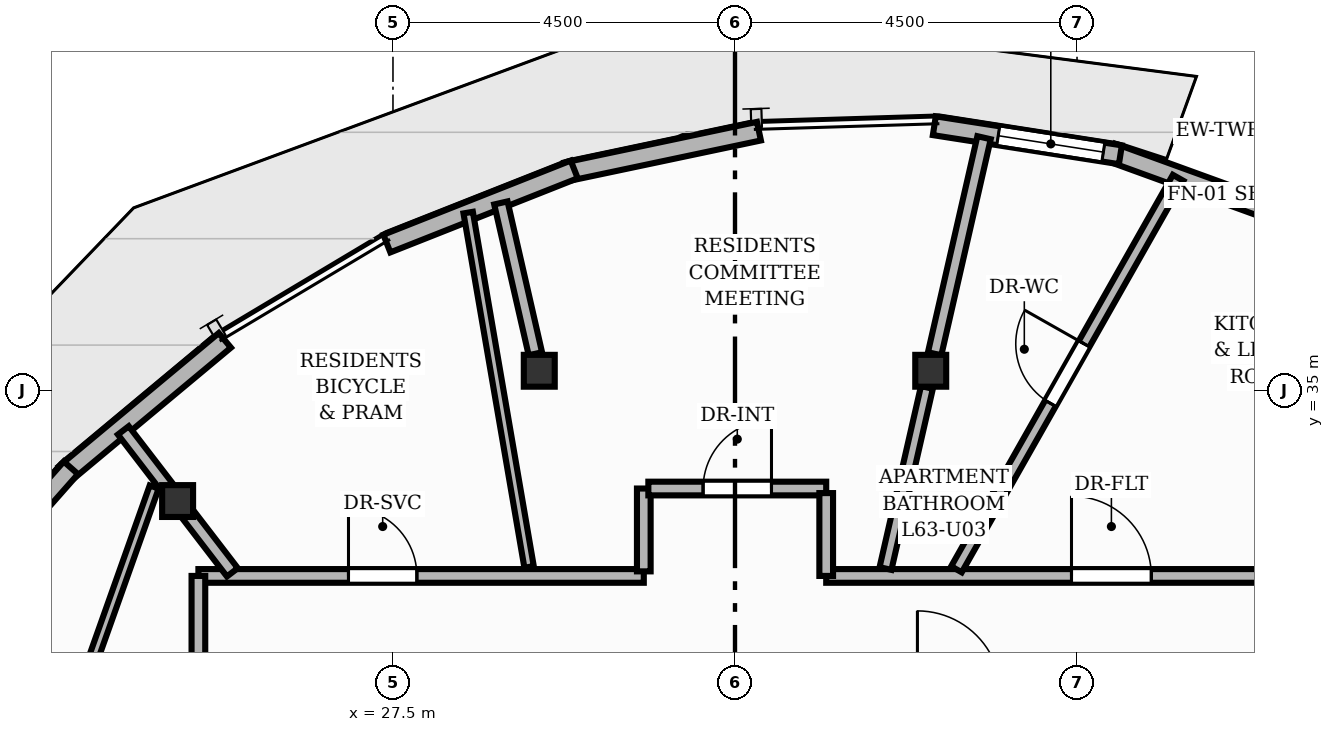
"""IFC4 building model, lengths in metres.
Left out: names, types, materials, properties, quantities, classifications, styles, units other than length and angle.
Written with IfcOpenShell. Run it as: python <this file> out.ifc"""

import sys

from ifc_helpers import new_model, si_unit, direction, frame, frame_2d, origin, origin_2d, place, context, subcontext, project, spatial, rectangle, i_section, extrude, element, fill, save


model = new_model("IFC4")
c1 = context("Model", 3, precision=1e-05, world=origin(), true_north=direction((0.0, 1.0)))
c2 = subcontext(c1, "Body", "Model", "MODEL_VIEW")
j1 = project(units=[si_unit("LENGTHUNIT", "METRE"), si_unit("PLANEANGLEUNIT", "RADIAN")], contexts=[c1])
p1 = place(None, origin())
s1 = spatial("IfcSite", under=j1, at=p1, CompositionType="ELEMENT")
p2 = place(p1, origin())
s2 = spatial("IfcBuilding", under=s1, at=p2, CompositionType="ELEMENT")
p3 = place(p2, frame((0.0, 0.0, 211.04)))
s3 = spatial("IfcBuildingStorey", under=s2, at=p3, CompositionType="ELEMENT", Elevation=211.04)
for number, where, z_axis, x_axis in (
    (1, (34.575, 35.26, 0.0), (0.0, 0.0, 1.0), (1.0, 0.0, 0.0)),
    (2, (29.425, 35.26, 0.0), (0.0, 0.0, 1.0), (1.0, 0.0, 0.0)),
    (3, (24.667, 33.545, 0.0), (0.0, 0.0, 1.0), (1.0, 0.0, 0.0)),
):
    element("IfcColumn", number, at=place(p3, frame(where, z_axis=z_axis, x_axis=x_axis)), inside=s3, PredefinedType="COLUMN", context=c2, shape_type="SweptSolid", body=[
        extrude(i_section(OverallWidth=0.407, OverallDepth=0.419, WebThickness=0.031, FlangeThickness=0.049, at=origin_2d()), origin(), (0.0, 0.0, 1.0), 3.2),
    ])
p4 = place(p3, frame((36.96, 38.13, 0.0), z_axis=(0.0, 0.0, 1.0), x_axis=(0.939954186413, -0.341300640851, 0.0)))
e4 = element("IfcWall", 4, at=p4, inside=s3, PredefinedType="SOLIDWALL", context=c2, shape_type="SweptSolid", body=[
    extrude(rectangle(XDim=2.437, YDim=0.25, at=frame_2d((1.219, 0.0))), origin(), (0.0, 0.0, 1.0), 2.96),
])
p5 = place(p3, frame((34.622, 38.484, 0.0), z_axis=(0.0, 0.0, 1.0), x_axis=(0.988040195026, -0.154196540209, 0.0)))
e5 = element("IfcWall", 5, at=p5, inside=s3, PredefinedType="SOLIDWALL", context=c2, shape_type="SweptSolid", body=[
    extrude(rectangle(XDim=2.478, YDim=0.25, at=frame_2d((1.239, 0.0))), origin(), (0.0, 0.0, 1.0), 2.96),
])
p6 = place(p5, frame((0.851, 0.0, 0.85)))
e6 = element("IfcOpeningElement", 6, at=p6, cuts=e5, PredefinedType="OPENING", context=c2, shape_type="SweptSolid", body=[
    extrude(rectangle(XDim=1.4, YDim=1.52, at=frame_2d((0.7, 0.76))), frame((0.0, 0.135, 0.0), z_axis=(0.0, -1.0, 0.0), x_axis=(1.0, 0.0, 0.0)), (0.0, 0.0, 1.0), 0.27),
])
p7 = place(p3, frame((29.779, 37.877, 0.0), z_axis=(0.0, 0.0, 1.0), x_axis=(0.978434707222, 0.206556345104, 0.0)))
e7 = element("IfcWall", 7, at=p7, inside=s3, PredefinedType="SOLIDWALL", context=c2, shape_type="SweptSolid", body=[
    extrude(rectangle(XDim=2.592, YDim=0.25, at=frame_2d((1.296, 0.0))), origin(), (0.0, 0.0, 1.0), 2.96),
])
p8 = place(p3, frame((27.42, 36.933, 0.0), z_axis=(0.0, 0.0, 1.0), x_axis=(0.929861098324, 0.36791077427, 0.0)))
e8 = element("IfcWall", 8, at=p8, inside=s3, PredefinedType="SOLIDWALL", context=c2, shape_type="SweptSolid", body=[
    extrude(rectangle(XDim=2.651, YDim=0.25, at=frame_2d((1.326, 0.0))), origin(), (0.0, 0.0, 1.0), 2.96),
])
p9 = place(p3, frame((23.184, 33.906, 0.0), z_axis=(0.0, 0.0, 1.0), x_axis=(0.76821397209, 0.640193168571, 0.0)))
e9 = element("IfcWall", 9, at=p9, inside=s3, PredefinedType="SOLIDWALL", context=c2, shape_type="SweptSolid", body=[
    extrude(rectangle(XDim=2.739, YDim=0.25, at=frame_2d((1.369, 0.0))), origin(), (0.0, 0.0, 1.0), 2.96),
])
p10 = place(p3, frame((21.437, 31.915, 0.0), z_axis=(0.0, 0.0, 1.0), x_axis=(0.661694827408, 0.749773269317, 0.0)))
e10 = element("IfcWall", 10, at=p10, inside=s3, PredefinedType="SOLIDWALL", context=c2, shape_type="SweptSolid", body=[
    extrude(rectangle(XDim=2.758, YDim=0.25, at=frame_2d((1.379, 0.0))), origin(), (0.0, 0.0, 1.0), 2.96),
])
p11 = place(p10, frame((0.554, 0.0, 0.85)))
e11 = element("IfcOpeningElement", 11, at=p11, cuts=e10, PredefinedType="OPENING", context=c2, shape_type="SweptSolid", body=[
    extrude(rectangle(XDim=1.65, YDim=1.55, at=frame_2d((0.825, 0.775))), frame((0.0, 0.135, 0.0), z_axis=(0.0, -1.0, 0.0), x_axis=(1.0, 0.0, 0.0)), (0.0, 0.0, 1.0), 0.27),
])
p12 = place(p3, frame((34.626, 35.483, 0.0), z_axis=(0.0, 0.0, 1.0), x_axis=(0.222945280676, 0.974830960641, 0.0)))
e12 = element("IfcWall", 12, at=p12, inside=s3, PredefinedType="PARTITIONING", context=c2, shape_type="SweptSolid", body=[
    extrude(rectangle(XDim=2.916, YDim=0.18, at=frame_2d((1.458, 0.0))), origin(), (0.0, 0.0, 1.0), 2.403),
])
p13 = place(p3, frame((29.374, 35.483, 0.0), z_axis=(0.0, 0.0, 1.0), x_axis=(-0.222932254148, 0.974833939736, 0.0)))
e13 = element("IfcWall", 13, at=p13, inside=s3, PredefinedType="PARTITIONING", context=c2, shape_type="SweptSolid", body=[
    extrude(rectangle(XDim=2.036, YDim=0.18, at=frame_2d((1.018, 0.0))), origin(), (0.0, 0.0, 1.0), 2.403),
])
p14 = place(p3, frame((24.527, 33.727, 0.0), z_axis=(0.0, 0.0, 1.0), x_axis=(-0.60903478373, 0.793143512995, 0.0)))
e14 = element("IfcWall", 14, at=p14, inside=s3, PredefinedType="PARTITIONING", context=c2, shape_type="SweptSolid", body=[
    extrude(rectangle(XDim=0.943, YDim=0.18, at=frame_2d((0.471, 0.0))), origin(), (0.0, 0.0, 1.0), 2.403),
])
p15 = place(p3, frame((33.2, 32.56, 0.0), z_axis=(0.0, 0.0, 1.0), x_axis=(1.0, 0.0, 0.0)))
e15 = element("IfcWall", 15, at=p15, inside=s3, PredefinedType="PARTITIONING", context=c2, shape_type="SweptSolid", body=[
    extrude(rectangle(XDim=5.86, YDim=0.18, at=frame_2d((2.93, 0.0))), origin(), (0.0, 0.0, 1.0), 2.955),
])
p16 = place(p15, frame((3.227, 0.0, 0.0)))
e16 = element("IfcOpeningElement", 16, at=p16, cuts=e15, PredefinedType="OPENING", context=c2, shape_type="SweptSolid", body=[
    extrude(rectangle(XDim=1.05, YDim=2.15, at=frame_2d((0.525, 1.075))), frame((0.0, 0.1, 0.0), z_axis=(0.0, -1.0, 0.0), x_axis=(1.0, 0.0, 0.0)), (0.0, 0.0, 1.0), 0.2),
])
p17 = place(p3, frame((24.94, 32.56, 0.0), z_axis=(0.0, 0.0, 1.0), x_axis=(1.0, 0.0, 0.0)))
e17 = element("IfcWall", 17, at=p17, inside=s3, PredefinedType="PARTITIONING", context=c2, shape_type="SweptSolid", body=[
    extrude(rectangle(XDim=5.86, YDim=0.18, at=frame_2d((2.93, 0.0))), origin(), (0.0, 0.0, 1.0), 2.955),
])
p18 = place(p17, frame((1.975, 0.0, 0.0)))
e18 = element("IfcOpeningElement", 18, at=p18, cuts=e17, PredefinedType="OPENING", context=c2, shape_type="SweptSolid", body=[
    extrude(rectangle(XDim=0.9, YDim=2.1, at=frame_2d((0.45, 1.05))), frame((0.0, 0.1, 0.0), z_axis=(0.0, -1.0, 0.0), x_axis=(1.0, 0.0, 0.0)), (0.0, 0.0, 1.0), 0.2),
])
p19 = place(p3, frame((30.8, 32.62, 0.0), z_axis=(0.0, 0.0, 1.0), x_axis=(0.0, 1.0, 0.0)))
e19 = element("IfcWall", 19, at=p19, inside=s3, PredefinedType="PARTITIONING", context=c2, shape_type="SweptSolid", body=[
    extrude(rectangle(XDim=1.09, YDim=0.18, at=frame_2d((0.545, 0.0))), origin(), (0.0, 0.0, 1.0), 2.955),
])
p20 = place(p3, frame((30.86, 33.71, 0.0), z_axis=(0.0, 0.0, 1.0), x_axis=(1.0, 0.0, 0.0)))
e20 = element("IfcWall", 20, at=p20, inside=s3, PredefinedType="PARTITIONING", context=c2, shape_type="SweptSolid", body=[
    extrude(rectangle(XDim=2.34, YDim=0.18, at=frame_2d((1.17, 0.0))), origin(), (0.0, 0.0, 1.0), 2.955),
])
p21 = place(p20, frame((0.72, 0.0, 0.0)))
e21 = element("IfcOpeningElement", 21, at=p21, cuts=e20, PredefinedType="OPENING", context=c2, shape_type="SweptSolid", body=[
    extrude(rectangle(XDim=0.9, YDim=2.1, at=frame_2d((0.45, 1.05))), frame((0.0, 0.1, 0.0), z_axis=(0.0, -1.0, 0.0), x_axis=(1.0, 0.0, 0.0)), (0.0, 0.0, 1.0), 0.2),
])
p22 = place(p3, frame((33.2, 33.65, 0.0), z_axis=(0.0, 0.0, 1.0), x_axis=(0.0, -1.0, 0.0)))
e22 = element("IfcWall", 22, at=p22, inside=s3, PredefinedType="PARTITIONING", context=c2, shape_type="SweptSolid", body=[
    extrude(rectangle(XDim=1.09, YDim=0.18, at=frame_2d((0.545, 0.0))), origin(), (0.0, 0.0, 1.0), 2.955),
])
p23 = place(p3, frame((24.94, 15.44, 0.0), z_axis=(0.0, 0.0, 1.0), x_axis=(0.0, 1.0, 0.0)))
e23 = element("IfcWall", 23, at=p23, inside=s3, PredefinedType="PARTITIONING", context=c2, shape_type="SweptSolid", body=[
    extrude(rectangle(XDim=17.12, YDim=0.18, at=frame_2d((8.56, 0.0))), origin(), (0.0, 0.0, 1.0), 2.955),
])
p24 = place(p23, frame((4.404, 0.0, 0.0)))
e24 = element("IfcOpeningElement", 24, at=p24, cuts=e23, PredefinedType="OPENING", context=c2, shape_type="SweptSolid", body=[
    extrude(rectangle(XDim=1.05, YDim=2.15, at=frame_2d((0.525, 1.075))), frame((0.0, 0.1, 0.0), z_axis=(0.0, -1.0, 0.0), x_axis=(1.0, 0.0, 0.0)), (0.0, 0.0, 1.0), 0.2),
])
p25 = place(p3, frame((34.914, 32.647, 0.0), z_axis=(0.0, 0.0, 1.0), x_axis=(0.492777372346, 0.870155423648, 0.0)))
e25 = element("IfcWall", 25, at=p25, inside=s3, PredefinedType="PLUMBINGWALL", context=c2, shape_type="SweptSolid", body=[
    extrude(rectangle(XDim=5.919, YDim=0.16, at=frame_2d((2.96, 0.0))), origin(), (0.0, 0.0, 1.0), 2.692),
])
p26 = place(p25, frame((2.51, 0.0, 0.0)))
e26 = element("IfcOpeningElement", 26, at=p26, cuts=e25, PredefinedType="OPENING", context=c2, shape_type="SweptSolid", body=[
    extrude(rectangle(XDim=0.9, YDim=2.1, at=frame_2d((0.45, 1.05))), frame((0.0, 0.09, 0.0), z_axis=(0.0, -1.0, 0.0), x_axis=(1.0, 0.0, 0.0)), (0.0, 0.0, 1.0), 0.18),
])
p27 = place(p3, frame((33.98, 32.657, 0.0), z_axis=(0.0, 0.0, 1.0), x_axis=(0.223006482474, 0.974816961678, 0.0)))
e27 = element("IfcWall", 27, at=p27, inside=s3, PredefinedType="PLUMBINGWALL", context=c2, shape_type="SweptSolid", body=[
    extrude(rectangle(XDim=2.445, YDim=0.16, at=frame_2d((1.222, 0.0))), origin(), (0.0, 0.0, 1.0), 2.403),
])
p28 = place(p3, frame((28.49, 37.341, 0.0), z_axis=(0.0, 0.0, 1.0), x_axis=(0.169376334169, -0.98555144839, 0.0)))
e28 = element("IfcWall", 28, at=p28, inside=s3, PredefinedType="PARTITIONING", context=c2, shape_type="SweptSolid", body=[
    extrude(rectangle(XDim=4.731, YDim=0.125, at=frame_2d((2.365, 0.0))), origin(), (0.0, 0.0, 1.0), 2.955),
])
p29 = place(p3, frame((25.387, 32.608, 0.0), z_axis=(0.0, 0.0, 1.0), x_axis=(-0.609302225724, 0.792938079378, 0.0)))
e29 = element("IfcWall", 29, at=p29, inside=s3, PredefinedType="PARTITIONING", context=c2, shape_type="SweptSolid", body=[
    extrude(rectangle(XDim=0.953, YDim=0.18, at=frame_2d((0.477, 0.0))), origin(), (0.0, 0.0, 1.0), 2.403),
])
p30 = place(p3, frame((20.501, 22.87, 0.0), z_axis=(0.0, 0.0, 1.0), x_axis=(0.334686593727, 0.942329498625, 0.0)))
e30 = element("IfcWall", 30, at=p30, inside=s3, PredefinedType="PARTITIONING", context=c2, shape_type="SweptSolid", body=[
    extrude(rectangle(XDim=11.525, YDim=0.125, at=frame_2d((5.762, 0.0))), origin(), (0.0, 0.0, 1.0), 2.488),
])
p31 = place(p30, frame((5.312, 0.0, 0.0)))
e31 = element("IfcOpeningElement", 31, at=p31, cuts=e30, PredefinedType="OPENING", context=c2, shape_type="SweptSolid", body=[
    extrude(rectangle(XDim=0.9, YDim=2.1, at=frame_2d((0.45, 1.05))), frame((0.0, 0.073, 0.0), z_axis=(0.0, -1.0, 0.0), x_axis=(1.0, 0.0, 0.0)), (0.0, 0.0, 1.0), 0.145),
])
p32 = place(p6, origin())
e32 = element("IfcWindow", 32, at=p32, inside=s3, PartitioningType="SINGLE_PANEL", PredefinedType="WINDOW", context=c2, shape_type="SweptSolid", body=[
    extrude(rectangle(XDim=1.4, YDim=1.52, at=frame_2d((0.7, 0.76))), frame((0.0, 0.03, 0.0), z_axis=(0.0, -1.0, 0.0), x_axis=(1.0, 0.0, 0.0)), (0.0, 0.0, 1.0), 0.06),
])
fill(e6, e32)
p33 = place(p16, origin())
e33 = element("IfcDoor", 33, at=p33, inside=s3, OperationType="SINGLE_SWING_LEFT", PredefinedType="DOOR", context=c2, shape_type="SweptSolid", body=[
    extrude(rectangle(XDim=1.05, YDim=2.15, at=frame_2d((0.525, 1.075))), frame((0.0, 0.025, 0.0), z_axis=(0.0, -1.0, 0.0), x_axis=(1.0, 0.0, 0.0)), (0.0, 0.0, 1.0), 0.05),
])
fill(e16, e33)
p34 = place(p26, origin())
e34 = element("IfcDoor", 34, at=p34, inside=s3, OperationType="SINGLE_SWING_RIGHT", PredefinedType="DOOR", context=c2, shape_type="SweptSolid", body=[
    extrude(rectangle(XDim=0.9, YDim=2.1, at=frame_2d((0.45, 1.05))), frame((0.0, 0.025, 0.0), z_axis=(0.0, -1.0, 0.0), x_axis=(1.0, 0.0, 0.0)), (0.0, 0.0, 1.0), 0.05),
])
fill(e26, e34)
p35 = place(p18, origin())
e35 = element("IfcDoor", 35, at=p35, inside=s3, OperationType="SINGLE_SWING_LEFT", PredefinedType="DOOR", context=c2, shape_type="SweptSolid", body=[
    extrude(rectangle(XDim=0.9, YDim=2.1, at=frame_2d((0.45, 1.05))), frame((0.0, 0.025, 0.0), z_axis=(0.0, -1.0, 0.0), x_axis=(1.0, 0.0, 0.0)), (0.0, 0.0, 1.0), 0.05),
])
fill(e18, e35)
p36 = place(p21, origin())
e36 = element("IfcDoor", 36, at=p36, inside=s3, OperationType="SINGLE_SWING_RIGHT", PredefinedType="DOOR", context=c2, shape_type="SweptSolid", body=[
    extrude(rectangle(XDim=0.9, YDim=2.1, at=frame_2d((0.45, 1.05))), frame((0.0, 0.025, 0.0), z_axis=(0.0, -1.0, 0.0), x_axis=(1.0, 0.0, 0.0)), (0.0, 0.0, 1.0), 0.05),
])
fill(e21, e36)
save(model, sys.argv[1])
